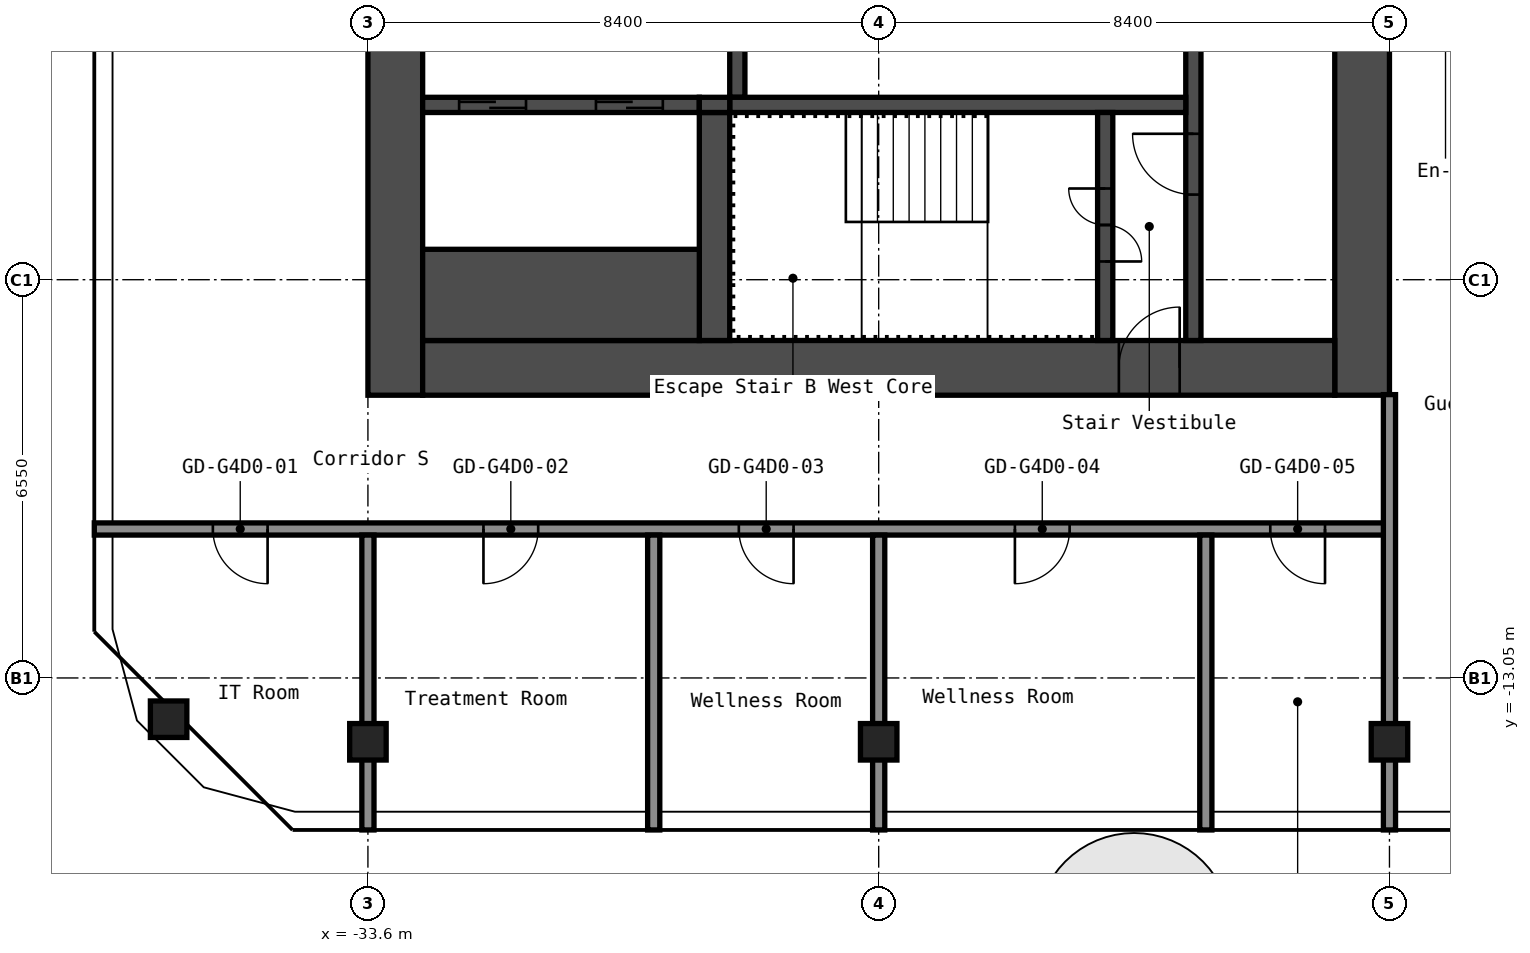
"""IFC4 building model, lengths in metres.
Left out: names, types, materials, properties, quantities, classifications, styles, units other than length and angle.
Written with IfcOpenShell. Run it as: python <this file> out.ifc"""

import sys

from ifc_helpers import new_model, si_unit, direction, frame, frame_2d, origin, origin_2d, place, context, subcontext, project, spatial, rectangle, hollow_rectangle, extrude, element, fill, save


model = new_model("IFC4")
c1 = context("Model", 3, precision=1e-05, world=origin(), true_north=direction((0.0, 1.0)))
c2 = subcontext(c1, "Body", "Model", "MODEL_VIEW")
j1 = project(units=[si_unit("LENGTHUNIT", "METRE"), si_unit("PLANEANGLEUNIT", "RADIAN")], contexts=[c1])
p1 = place(None, origin())
s1 = spatial("IfcSite", under=j1, at=p1, CompositionType="ELEMENT")
p2 = place(p1, origin())
s2 = spatial("IfcBuilding", under=s1, at=p2, CompositionType="ELEMENT")
p3 = place(p2, frame((0.0, 0.0, 196.2)))
s3 = spatial("IfcBuildingStorey", under=s2, at=p3, CompositionType="ELEMENT", Elevation=196.2)
for number, where, z_axis, x_axis in (
    (1, (-36.878, -13.729, 0.0), (0.0, 0.0, 1.0), (1.0, 0.0, 0.0)),
    (2, (-33.6, -14.1, 0.0), (0.0, 0.0, 1.0), (1.0, 0.0, 0.0)),
    (3, (-25.2, -14.1, 0.0), (0.0, 0.0, 1.0), (1.0, 0.0, 0.0)),
    (4, (-16.8, -14.1, 0.0), (0.0, 0.0, 1.0), (1.0, 0.0, 0.0)),
):
    element("IfcColumn", number, at=place(p3, frame(where, z_axis=z_axis, x_axis=x_axis)), inside=s3, PredefinedType="COLUMN", context=c2, shape_type="SweptSolid", body=[
        extrude(hollow_rectangle(XDim=0.6, YDim=0.6, WallThickness=0.025, InnerFilletRadius=0.038, OuterFilletRadius=0.062, at=origin_2d()), origin(), (0.0, 0.0, 1.0), 2.75),
    ])
p4 = place(p3, frame((-17.25, -8.4, 0.0), z_axis=(0.0, 0.0, 1.0), x_axis=(0.0, 1.0, 0.0)))
e5 = element("IfcWall", 5, at=p4, inside=s3, PredefinedType="SHEAR", context=c2, shape_type="SweptSolid", body=[
    extrude(rectangle(XDim=16.8, YDim=0.9, at=frame_2d((8.4, 0.0))), origin(), (0.0, 0.0, 1.0), 2.75),
])
p5 = place(p4, frame((10.1, 0.0, 0.0)))
e6 = element("IfcOpeningElement", 6, at=p5, cuts=e5, PredefinedType="OPENING", context=c2, shape_type="SweptSolid", body=[
    extrude(rectangle(XDim=1.6, YDim=2.1, at=frame_2d((0.8, 1.05))), frame((0.0, 0.46, 0.0), z_axis=(0.0, -1.0, 0.0), x_axis=(1.0, 0.0, 0.0)), (0.0, 0.0, 1.0), 0.92),
])
p6 = place(p3, frame((-33.15, -8.4, 0.0), z_axis=(0.0, 0.0, 1.0), x_axis=(0.0, 1.0, 0.0)))
e7 = element("IfcWall", 7, at=p6, inside=s3, PredefinedType="SHEAR", context=c2, shape_type="SweptSolid", body=[
    extrude(rectangle(XDim=16.8, YDim=0.9, at=frame_2d((8.4, 0.0))), origin(), (0.0, 0.0, 1.0), 2.75),
])
p7 = place(p3, frame((-32.7, -7.95, 0.0), z_axis=(0.0, 0.0, 1.0), x_axis=(1.0, 0.0, 0.0)))
e8 = element("IfcWall", 8, at=p7, inside=s3, PredefinedType="SHEAR", context=c2, shape_type="SweptSolid", body=[
    extrude(rectangle(XDim=15.0, YDim=0.9, at=frame_2d((7.5, 0.0))), origin(), (0.0, 0.0, 1.0), 2.75),
])
p8 = place(p7, frame((11.45, 0.0, 0.0)))
e9 = element("IfcOpeningElement", 9, at=p8, cuts=e8, PredefinedType="OPENING", context=c2, shape_type="SweptSolid", body=[
    extrude(rectangle(XDim=1.0, YDim=2.1, at=frame_2d((0.5, 1.05))), frame((0.0, 0.46, 0.0), z_axis=(0.0, -1.0, 0.0), x_axis=(1.0, 0.0, 0.0)), (0.0, 0.0, 1.0), 0.92),
])
p9 = place(p3, frame((-20.025, -7.5, 0.0), z_axis=(0.0, 0.0, 1.0), x_axis=(0.0, 1.0, 0.0)))
e10 = element("IfcWall", 10, at=p9, inside=s3, PredefinedType="SHEAR", context=c2, shape_type="SweptSolid", body=[
    extrude(rectangle(XDim=6.3, YDim=0.25, at=frame_2d((3.15, 0.0))), origin(), (0.0, 0.0, 1.0), 2.75),
])
p10 = place(p9, frame((2.4, 0.0, 0.0)))
e11 = element("IfcOpeningElement", 11, at=p10, cuts=e10, PredefinedType="OPENING", context=c2, shape_type="SweptSolid", body=[
    extrude(rectangle(XDim=1.0, YDim=2.1, at=frame_2d((0.5, 1.05))), frame((0.0, 0.135, 0.0), z_axis=(0.0, -1.0, 0.0), x_axis=(1.0, 0.0, 0.0)), (0.0, 0.0, 1.0), 0.27),
])
p11 = place(p3, frame((-27.525, -3.5, 0.0), z_axis=(0.0, 0.0, 1.0), x_axis=(0.0, 1.0, 0.0)))
e12 = element("IfcWall", 12, at=p11, inside=s3, PredefinedType="SHEAR", context=c2, shape_type="SweptSolid", body=[
    extrude(rectangle(XDim=2.05, YDim=0.25, at=frame_2d((1.025, 0.0))), origin(), (0.0, 0.0, 1.0), 2.75),
])
p12 = place(p3, frame((-27.65, -3.625, 0.0), z_axis=(0.0, 0.0, 1.0), x_axis=(1.0, 0.0, 0.0)))
e13 = element("IfcWall", 13, at=p12, inside=s3, PredefinedType="SHEAR", context=c2, shape_type="SweptSolid", body=[
    extrude(rectangle(XDim=7.5, YDim=0.25, at=frame_2d((3.75, 0.0))), origin(), (0.0, 0.0, 1.0), 2.75),
])
p13 = place(p3, frame((-21.475, -7.5, 0.0), z_axis=(0.0, 0.0, 1.0), x_axis=(0.0, 1.0, 0.0)))
e14 = element("IfcWall", 14, at=p13, inside=s3, PredefinedType="SHEAR", context=c2, shape_type="SweptSolid", body=[
    extrude(rectangle(XDim=3.75, YDim=0.25, at=frame_2d((1.875, 0.0))), origin(), (0.0, 0.0, 1.0), 2.75),
])
p14 = place(p13, frame((1.3, 0.0, 0.0)))
e15 = element("IfcOpeningElement", 15, at=p14, cuts=e14, PredefinedType="OPENING", context=c2, shape_type="SweptSolid", body=[
    extrude(rectangle(XDim=1.2, YDim=2.1, at=frame_2d((0.6, 1.05))), frame((0.0, 0.135, 0.0), z_axis=(0.0, -1.0, 0.0), x_axis=(1.0, 0.0, 0.0)), (0.0, 0.0, 1.0), 0.27),
])
p15 = place(p3, frame((-27.9, -7.5, 0.0), z_axis=(0.0, 0.0, 1.0), x_axis=(0.0, 1.0, 0.0)))
e16 = element("IfcWall", 16, at=p15, inside=s3, PredefinedType="SHEAR", context=c2, shape_type="SweptSolid", body=[
    extrude(rectangle(XDim=3.75, YDim=0.5, at=frame_2d((1.875, 0.0))), origin(), (0.0, 0.0, 1.0), 2.75),
])
p16 = place(p3, frame((-32.7, -3.625, 0.0), z_axis=(0.0, 0.0, 1.0), x_axis=(1.0, 0.0, 0.0)))
e17 = element("IfcWall", 17, at=p16, inside=s3, PredefinedType="SHEAR", context=c2, shape_type="SweptSolid", body=[
    extrude(rectangle(XDim=4.55, YDim=0.25, at=frame_2d((2.275, 0.0))), origin(), (0.0, 0.0, 1.0), 2.75),
])
p17 = place(p16, frame((2.85, 0.0, 0.0)))
e18 = element("IfcOpeningElement", 18, at=p17, cuts=e17, PredefinedType="OPENING", context=c2, shape_type="SweptSolid", body=[
    extrude(rectangle(XDim=1.1, YDim=2.1, at=frame_2d((0.55, 1.05))), frame((0.0, 0.135, 0.0), z_axis=(0.0, -1.0, 0.0), x_axis=(1.0, 0.0, 0.0)), (0.0, 0.0, 1.0), 0.27),
])
p18 = place(p16, frame((0.6, 0.0, 0.0)))
e19 = element("IfcOpeningElement", 19, at=p18, cuts=e17, PredefinedType="OPENING", context=c2, shape_type="SweptSolid", body=[
    extrude(rectangle(XDim=1.1, YDim=2.1, at=frame_2d((0.55, 1.05))), frame((0.0, 0.135, 0.0), z_axis=(0.0, -1.0, 0.0), x_axis=(1.0, 0.0, 0.0)), (0.0, 0.0, 1.0), 0.27),
])
p19 = place(p3, frame((-32.7, -6.75, 0.0), z_axis=(0.0, 0.0, 1.0), x_axis=(1.0, 0.0, 0.0)))
e20 = element("IfcWall", 20, at=p19, inside=s3, PredefinedType="SHEAR", context=c2, shape_type="SweptSolid", body=[
    extrude(rectangle(XDim=4.55, YDim=1.5, at=frame_2d((2.275, 0.0))), origin(), (0.0, 0.0, 1.0), 2.75),
])
p20 = place(p3, frame((-28.15, -3.625, 0.0), z_axis=(0.0, 0.0, 1.0), x_axis=(1.0, 0.0, 0.0)))
e21 = element("IfcWall", 21, at=p20, inside=s3, PredefinedType="SHEAR", context=c2, shape_type="SweptSolid", body=[
    extrude(rectangle(XDim=0.5, YDim=0.25, at=frame_2d((0.25, 0.0))), origin(), (0.0, 0.0, 1.0), 2.75),
])
p21 = place(p3, frame((-38.1, -10.6, 0.0), z_axis=(0.0, 0.0, 1.0), x_axis=(1.0, 0.0, 0.0)))
e22 = element("IfcWall", 22, at=p21, inside=s3, PredefinedType="PARTITIONING", context=c2, shape_type="SweptSolid", body=[
    extrude(rectangle(XDim=21.3, YDim=0.2, at=frame_2d((10.65, 0.0))), origin(), (0.0, 0.0, 1.0), 2.75),
])
p22 = place(p21, frame((1.95, 0.0, 0.0)))
e23 = element("IfcOpeningElement", 23, at=p22, cuts=e22, PredefinedType="OPENING", context=c2, shape_type="SweptSolid", body=[
    extrude(rectangle(XDim=0.9, YDim=2.1, at=frame_2d((0.45, 1.05))), frame((0.0, 0.11, 0.0), z_axis=(0.0, -1.0, 0.0), x_axis=(1.0, 0.0, 0.0)), (0.0, 0.0, 1.0), 0.22),
])
p23 = place(p21, frame((6.4, 0.0, 0.0)))
e24 = element("IfcOpeningElement", 24, at=p23, cuts=e22, PredefinedType="OPENING", context=c2, shape_type="SweptSolid", body=[
    extrude(rectangle(XDim=0.9, YDim=2.1, at=frame_2d((0.45, 1.05))), frame((0.0, 0.11, 0.0), z_axis=(0.0, -1.0, 0.0), x_axis=(1.0, 0.0, 0.0)), (0.0, 0.0, 1.0), 0.22),
])
p24 = place(p21, frame((10.6, 0.0, 0.0)))
e25 = element("IfcOpeningElement", 25, at=p24, cuts=e22, PredefinedType="OPENING", context=c2, shape_type="SweptSolid", body=[
    extrude(rectangle(XDim=0.9, YDim=2.1, at=frame_2d((0.45, 1.05))), frame((0.0, 0.11, 0.0), z_axis=(0.0, -1.0, 0.0), x_axis=(1.0, 0.0, 0.0)), (0.0, 0.0, 1.0), 0.22),
])
p25 = place(p21, frame((15.14, 0.0, 0.0)))
e26 = element("IfcOpeningElement", 26, at=p25, cuts=e22, PredefinedType="OPENING", context=c2, shape_type="SweptSolid", body=[
    extrude(rectangle(XDim=0.9, YDim=2.1, at=frame_2d((0.45, 1.05))), frame((0.0, 0.11, 0.0), z_axis=(0.0, -1.0, 0.0), x_axis=(1.0, 0.0, 0.0)), (0.0, 0.0, 1.0), 0.22),
])
p26 = place(p21, frame((19.34, 0.0, 0.0)))
e27 = element("IfcOpeningElement", 27, at=p26, cuts=e22, PredefinedType="OPENING", context=c2, shape_type="SweptSolid", body=[
    extrude(rectangle(XDim=0.9, YDim=2.1, at=frame_2d((0.45, 1.05))), frame((0.0, 0.11, 0.0), z_axis=(0.0, -1.0, 0.0), x_axis=(1.0, 0.0, 0.0)), (0.0, 0.0, 1.0), 0.22),
])
for number, where, z_axis, x_axis in (
    (28, (-33.6, -15.55, 0.0), (0.0, 0.0, 1.0), (0.0, 1.0, 0.0)),
    (29, (-28.9, -15.55, 0.0), (0.0, 0.0, 1.0), (0.0, 1.0, 0.0)),
    (30, (-25.2, -15.55, 0.0), (0.0, 0.0, 1.0), (0.0, 1.0, 0.0)),
    (31, (-19.82, -15.55, 0.0), (0.0, 0.0, 1.0), (0.0, 1.0, 0.0)),
):
    element("IfcWall", number, at=place(p3, frame(where, z_axis=z_axis, x_axis=x_axis)), inside=s3, PredefinedType="PARTITIONING", context=c2, shape_type="SweptSolid", body=[
        extrude(rectangle(XDim=4.85, YDim=0.2, at=frame_2d((2.425, 0.0))), origin(), (0.0, 0.0, 1.0), 2.75),
    ])
p27 = place(p3, frame((-16.8, -15.55, 0.0), z_axis=(0.0, 0.0, 1.0), x_axis=(0.0, 1.0, 0.0)))
e32 = element("IfcWall", 32, at=p27, inside=s3, PredefinedType="PARTITIONING", context=c2, shape_type="SweptSolid", body=[
    extrude(rectangle(XDim=7.16, YDim=0.2, at=frame_2d((3.58, 0.0))), origin(), (0.0, 0.0, 1.0), 2.75),
])
p28 = place(p8, origin())
e33 = element("IfcDoor", 33, at=p28, inside=s3, OperationType="SINGLE_SWING_LEFT", PredefinedType="DOOR", context=c2, shape_type="SweptSolid", body=[
    extrude(rectangle(XDim=1.0, YDim=2.1, at=frame_2d((0.5, 1.05))), frame((0.0, 0.025, 0.0), z_axis=(0.0, -1.0, 0.0), x_axis=(1.0, 0.0, 0.0)), (0.0, 0.0, 1.0), 0.05),
])
fill(e9, e33)
p29 = place(p14, origin())
e34 = element("IfcDoor", 34, at=p29, inside=s3, OperationType="DOUBLE_DOOR_SINGLE_SWING", PredefinedType="DOOR", context=c2, shape_type="SweptSolid", body=[
    extrude(rectangle(XDim=1.2, YDim=2.1, at=frame_2d((0.6, 1.05))), frame((0.0, 0.025, 0.0), z_axis=(0.0, -1.0, 0.0), x_axis=(1.0, 0.0, 0.0)), (0.0, 0.0, 1.0), 0.05),
])
fill(e15, e34)
p30 = place(p10, origin())
e35 = element("IfcDoor", 35, at=p30, inside=s3, OperationType="SINGLE_SWING_LEFT", PredefinedType="DOOR", context=c2, shape_type="SweptSolid", body=[
    extrude(rectangle(XDim=1.0, YDim=2.1, at=frame_2d((0.5, 1.05))), frame((0.0, 0.025, 0.0), z_axis=(0.0, -1.0, 0.0), x_axis=(1.0, 0.0, 0.0)), (0.0, 0.0, 1.0), 0.05),
])
fill(e11, e35)
p31 = place(p17, origin())
e36 = element("IfcDoor", 36, at=p31, inside=s3, OperationType="DOUBLE_DOOR_SLIDING", PredefinedType="DOOR", context=c2, shape_type="SweptSolid", body=[
    extrude(rectangle(XDim=1.1, YDim=2.1, at=frame_2d((0.55, 1.05))), frame((0.0, 0.025, 0.0), z_axis=(0.0, -1.0, 0.0), x_axis=(1.0, 0.0, 0.0)), (0.0, 0.0, 1.0), 0.05),
])
fill(e18, e36)
p32 = place(p18, origin())
e37 = element("IfcDoor", 37, at=p32, inside=s3, OperationType="DOUBLE_DOOR_SLIDING", PredefinedType="DOOR", context=c2, shape_type="SweptSolid", body=[
    extrude(rectangle(XDim=1.1, YDim=2.1, at=frame_2d((0.55, 1.05))), frame((0.0, 0.025, 0.0), z_axis=(0.0, -1.0, 0.0), x_axis=(1.0, 0.0, 0.0)), (0.0, 0.0, 1.0), 0.05),
])
fill(e19, e37)
p33 = place(p22, origin())
e38 = element("IfcDoor", 38, at=p33, inside=s3, OperationType="SINGLE_SWING_RIGHT", PredefinedType="DOOR", context=c2, shape_type="SweptSolid", body=[
    extrude(rectangle(XDim=0.9, YDim=2.1, at=frame_2d((0.45, 1.05))), frame((0.0, 0.025, 0.0), z_axis=(0.0, -1.0, 0.0), x_axis=(1.0, 0.0, 0.0)), (0.0, 0.0, 1.0), 0.05),
])
fill(e23, e38)
p34 = place(p23, origin())
e39 = element("IfcDoor", 39, at=p34, inside=s3, OperationType="SINGLE_SWING_LEFT", PredefinedType="DOOR", context=c2, shape_type="SweptSolid", body=[
    extrude(rectangle(XDim=0.9, YDim=2.1, at=frame_2d((0.45, 1.05))), frame((0.0, 0.025, 0.0), z_axis=(0.0, -1.0, 0.0), x_axis=(1.0, 0.0, 0.0)), (0.0, 0.0, 1.0), 0.05),
])
fill(e24, e39)
p35 = place(p24, origin())
e40 = element("IfcDoor", 40, at=p35, inside=s3, OperationType="SINGLE_SWING_RIGHT", PredefinedType="DOOR", context=c2, shape_type="SweptSolid", body=[
    extrude(rectangle(XDim=0.9, YDim=2.1, at=frame_2d((0.45, 1.05))), frame((0.0, 0.025, 0.0), z_axis=(0.0, -1.0, 0.0), x_axis=(1.0, 0.0, 0.0)), (0.0, 0.0, 1.0), 0.05),
])
fill(e25, e40)
p36 = place(p25, origin())
e41 = element("IfcDoor", 41, at=p36, inside=s3, OperationType="SINGLE_SWING_LEFT", PredefinedType="DOOR", context=c2, shape_type="SweptSolid", body=[
    extrude(rectangle(XDim=0.9, YDim=2.1, at=frame_2d((0.45, 1.05))), frame((0.0, 0.025, 0.0), z_axis=(0.0, -1.0, 0.0), x_axis=(1.0, 0.0, 0.0)), (0.0, 0.0, 1.0), 0.05),
])
fill(e26, e41)
p37 = place(p26, origin())
e42 = element("IfcDoor", 42, at=p37, inside=s3, OperationType="SINGLE_SWING_RIGHT", PredefinedType="DOOR", context=c2, shape_type="SweptSolid", body=[
    extrude(rectangle(XDim=0.9, YDim=2.1, at=frame_2d((0.45, 1.05))), frame((0.0, 0.025, 0.0), z_axis=(0.0, -1.0, 0.0), x_axis=(1.0, 0.0, 0.0)), (0.0, 0.0, 1.0), 0.05),
])
fill(e27, e42)
save(model, sys.argv[1])
